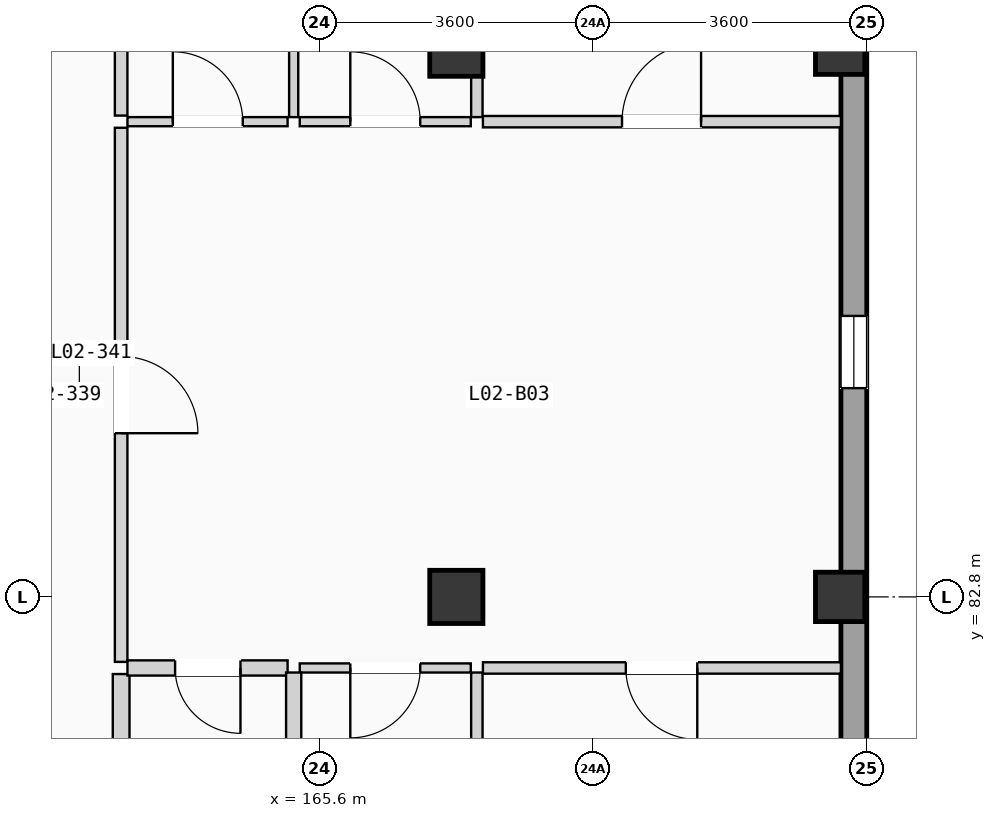
"""IFC4 building model, lengths in metres.
Left out: names, types, materials, properties, quantities, classifications, styles, units other than length and angle.
Written with IfcOpenShell. Run it as: python <this file> out.ifc"""

import sys

from ifc_helpers import new_model, si_unit, direction, frame, frame_2d, origin, origin_2d, place, context, subcontext, project, spatial, rectangle, extrude, element, fill, save


model = new_model("IFC4")
c1 = context("Model", 3, precision=1e-05, world=origin(), true_north=direction((0.0, 1.0)))
c2 = subcontext(c1, "Body", "Model", "MODEL_VIEW")
j1 = project(units=[si_unit("LENGTHUNIT", "METRE"), si_unit("PLANEANGLEUNIT", "RADIAN")], contexts=[c1])
p1 = place(None, origin())
s1 = spatial("IfcSite", under=j1, at=p1, CompositionType="ELEMENT")
p2 = place(p1, origin())
s2 = spatial("IfcBuilding", under=s1, at=p2, CompositionType="ELEMENT")
p3 = place(p2, frame((0.0, 0.0, 8.575)))
s3 = spatial("IfcBuildingStorey", under=s2, at=p3, CompositionType="ELEMENT", Elevation=8.575)
for number, where, z_axis, x_axis in (
    (1, (167.4, 82.8, 0.0), (0.0, 0.0, 1.0), (1.0, 0.0, 0.0)),
    (2, (167.4, 90.0, 0.0), (0.0, 0.0, 1.0), (1.0, 0.0, 0.0)),
):
    element("IfcColumn", number, at=place(p3, frame(where, z_axis=z_axis, x_axis=x_axis)), inside=s3, PredefinedType="COLUMN", context=c2, shape_type="SweptSolid", body=[
        extrude(rectangle(XDim=0.7, YDim=0.7, at=origin_2d()), origin(), (0.0, 0.0, 1.0), 3.5),
    ])
for number, where, z_axis, x_axis in (
    (3, (172.45, 82.8, 0.0), (0.0, 0.0, 1.0), (1.0, 0.0, 0.0)),
    (4, (172.45, 90.0, 0.0), (0.0, 0.0, 1.0), (1.0, 0.0, 0.0)),
):
    element("IfcColumn", number, at=place(p3, frame(where, z_axis=z_axis, x_axis=x_axis)), inside=s3, PredefinedType="COLUMN", context=c2, shape_type="SweptSolid", body=[
        extrude(rectangle(XDim=0.65, YDim=0.65, at=origin_2d()), origin(), (0.0, 0.0, 1.0), 3.5),
    ])
p4 = place(p3, frame((172.63, 68.74, 0.0), z_axis=(0.0, 0.0, 1.0), x_axis=(0.0, 1.0, 0.0)))
e5 = element("IfcWall", 5, at=p4, inside=s3, PredefinedType="SOLIDWALL", context=c2, shape_type="SweptSolid", body=[
    extrude(rectangle(XDim=49.72, YDim=0.34, at=frame_2d((24.86, 0.0))), origin(), (0.0, 0.0, 1.0), 3.24),
])
p5 = place(p4, frame((16.807, 0.0, 0.9)))
e6 = element("IfcOpeningElement", 6, at=p5, cuts=e5, PredefinedType="OPENING", context=c2, shape_type="SweptSolid", body=[
    extrude(rectangle(XDim=0.95, YDim=1.5, at=frame_2d((0.475, 0.75))), frame((0.0, 0.18, 0.0), z_axis=(0.0, -1.0, 0.0), x_axis=(1.0, 0.0, 0.0)), (0.0, 0.0, 1.0), 0.36),
])
p6 = place(p4, frame((9.678, 0.0, 0.9)))
e7 = element("IfcOpeningElement", 7, at=p6, cuts=e5, PredefinedType="OPENING", context=c2, shape_type="SweptSolid", body=[
    extrude(rectangle(XDim=0.95, YDim=1.65, at=frame_2d((0.475, 0.825))), frame((0.0, 0.18, 0.0), z_axis=(0.0, -1.0, 0.0), x_axis=(1.0, 0.0, 0.0)), (0.0, 0.0, 1.0), 0.36),
])
p7 = place(p4, frame((23.379, 0.0, 0.755)))
e8 = element("IfcOpeningElement", 8, at=p7, cuts=e5, PredefinedType="OPENING", context=c2, shape_type="SweptSolid", body=[
    extrude(rectangle(XDim=0.95, YDim=1.8, at=frame_2d((0.475, 0.9))), frame((0.0, 0.18, 0.0), z_axis=(0.0, -1.0, 0.0), x_axis=(1.0, 0.0, 0.0)), (0.0, 0.0, 1.0), 0.36),
])
p8 = place(p4, frame((32.885, 0.0, 0.9)))
e9 = element("IfcOpeningElement", 9, at=p8, cuts=e5, PredefinedType="OPENING", context=c2, shape_type="SweptSolid", body=[
    extrude(rectangle(XDim=1.05, YDim=1.2, at=frame_2d((0.525, 0.6))), frame((0.0, 0.18, 0.0), z_axis=(0.0, -1.0, 0.0), x_axis=(1.0, 0.0, 0.0)), (0.0, 0.0, 1.0), 0.36),
])
p9 = place(p4, frame((29.475, 0.0, 0.9)))
e10 = element("IfcOpeningElement", 10, at=p9, cuts=e5, PredefinedType="OPENING", context=c2, shape_type="SweptSolid", body=[
    extrude(rectangle(XDim=1.05, YDim=1.35, at=frame_2d((0.525, 0.675))), frame((0.0, 0.18, 0.0), z_axis=(0.0, -1.0, 0.0), x_axis=(1.0, 0.0, 0.0)), (0.0, 0.0, 1.0), 0.36),
])
p10 = place(p4, frame((39.479, 0.0, 0.9)))
e11 = element("IfcOpeningElement", 11, at=p10, cuts=e5, PredefinedType="OPENING", context=c2, shape_type="SweptSolid", body=[
    extrude(rectangle(XDim=1.05, YDim=1.5, at=frame_2d((0.525, 0.75))), frame((0.0, 0.18, 0.0), z_axis=(0.0, -1.0, 0.0), x_axis=(1.0, 0.0, 0.0)), (0.0, 0.0, 1.0), 0.36),
])
p11 = place(p3, frame((162.99, 81.945, 0.0), z_axis=(0.0, 0.0, 1.0), x_axis=(0.0, 1.0, 0.0)))
e12 = element("IfcWall", 12, at=p11, inside=s3, PredefinedType="PARTITIONING", context=c2, shape_type="SweptSolid", body=[
    extrude(rectangle(XDim=7.028, YDim=0.165, at=frame_2d((3.514, 0.0))), origin(), (0.0, 0.0, 1.0), 3.22),
])
p12 = place(p11, frame((3.009, 0.0, 0.0)))
e13 = element("IfcOpeningElement", 13, at=p12, cuts=e12, PredefinedType="OPENING", context=c2, shape_type="SweptSolid", body=[
    extrude(rectangle(XDim=1.01, YDim=2.11, at=frame_2d((0.505, 1.055))), frame((0.0, 0.093, 0.0), z_axis=(0.0, -1.0, 0.0), x_axis=(1.0, 0.0, 0.0)), (0.0, 0.0, 1.0), 0.185),
])
p13 = place(p3, frame((162.99, 75.975, 0.0), z_axis=(0.0, 0.0, 1.0), x_axis=(0.0, 1.0, 0.0)))
e14 = element("IfcWall", 14, at=p13, inside=s3, PredefinedType="PLUMBINGWALL", context=c2, shape_type="SweptSolid", body=[
    extrude(rectangle(XDim=5.81, YDim=0.22, at=frame_2d((2.905, 0.0))), origin(), (0.0, 0.0, 1.0), 3.22),
])
p14 = place(p3, frame((162.99, 89.133, 0.0), z_axis=(0.0, 0.0, 1.0), x_axis=(0.0, 1.0, 0.0)))
e15 = element("IfcWall", 15, at=p14, inside=s3, PredefinedType="PARTITIONING", context=c2, shape_type="SweptSolid", body=[
    extrude(rectangle(XDim=5.785, YDim=0.165, at=frame_2d((2.893, 0.0))), origin(), (0.0, 0.0, 1.0), 3.22),
])
p15 = place(p3, frame((163.073, 81.865, 0.0), z_axis=(0.0, 0.0, 1.0), x_axis=(1.0, 0.0, 0.0)))
e16 = element("IfcWall", 16, at=p15, inside=s3, PredefinedType="PLUMBINGWALL", context=c2, shape_type="SweptSolid", body=[
    extrude(rectangle(XDim=2.107, YDim=0.2, at=frame_2d((1.053, 0.0))), origin(), (0.0, 0.0, 1.0), 3.22),
])
p16 = place(p15, frame((0.627, 0.0, 0.0)))
e17 = element("IfcOpeningElement", 17, at=p16, cuts=e16, PredefinedType="OPENING", context=c2, shape_type="SweptSolid", body=[
    extrude(rectangle(XDim=0.86, YDim=2.0, at=frame_2d((0.43, 1.0))), frame((0.0, 0.11, 0.0), z_axis=(0.0, -1.0, 0.0), x_axis=(1.0, 0.0, 0.0)), (0.0, 0.0, 1.0), 0.22),
])
p17 = place(p3, frame((163.073, 89.053, 0.0), z_axis=(0.0, 0.0, 1.0), x_axis=(1.0, 0.0, 0.0)))
e18 = element("IfcWall", 18, at=p17, inside=s3, PredefinedType="PARTITIONING", context=c2, shape_type="SweptSolid", body=[
    extrude(rectangle(XDim=2.107, YDim=0.12, at=frame_2d((1.053, 0.0))), origin(), (0.0, 0.0, 1.0), 3.22),
])
p18 = place(p17, frame((0.597, 0.0, 0.0)))
e19 = element("IfcOpeningElement", 19, at=p18, cuts=e18, PredefinedType="OPENING", context=c2, shape_type="SweptSolid", body=[
    extrude(rectangle(XDim=0.92, YDim=2.02, at=frame_2d((0.46, 1.01))), frame((0.0, 0.07, 0.0), z_axis=(0.0, -1.0, 0.0), x_axis=(1.0, 0.0, 0.0)), (0.0, 0.0, 1.0), 0.14),
])
p19 = place(p3, frame((167.75, 81.865, 0.0), z_axis=(0.0, 0.0, 1.0), x_axis=(1.0, 0.0, 0.0)))
e20 = element("IfcWall", 20, at=p19, inside=s3, PredefinedType="PARTITIONING", context=c2, shape_type="SweptSolid", body=[
    extrude(rectangle(XDim=4.71, YDim=0.15, at=frame_2d((2.355, 0.0))), origin(), (0.0, 0.0, 1.0), 3.22),
])
p20 = place(p19, frame((1.88, 0.0, 0.0)))
e21 = element("IfcOpeningElement", 21, at=p20, cuts=e20, PredefinedType="OPENING", context=c2, shape_type="SweptSolid", body=[
    extrude(rectangle(XDim=0.94, YDim=2.06, at=frame_2d((0.47, 1.03))), frame((0.0, 0.085, 0.0), z_axis=(0.0, -1.0, 0.0), x_axis=(1.0, 0.0, 0.0)), (0.0, 0.0, 1.0), 0.17),
])
p21 = place(p3, frame((165.34, 81.865, 0.0), z_axis=(0.0, 0.0, 1.0), x_axis=(1.0, 0.0, 0.0)))
e22 = element("IfcWall", 22, at=p21, inside=s3, PredefinedType="PARTITIONING", context=c2, shape_type="SweptSolid", body=[
    extrude(rectangle(XDim=2.25, YDim=0.12, at=frame_2d((1.125, 0.0))), origin(), (0.0, 0.0, 1.0), 3.22),
])
p22 = place(p21, frame((0.665, 0.0, 0.0)))
e23 = element("IfcOpeningElement", 23, at=p22, cuts=e22, PredefinedType="OPENING", context=c2, shape_type="SweptSolid", body=[
    extrude(rectangle(XDim=0.92, YDim=2.02, at=frame_2d((0.46, 1.01))), frame((0.0, 0.07, 0.0), z_axis=(0.0, -1.0, 0.0), x_axis=(1.0, 0.0, 0.0)), (0.0, 0.0, 1.0), 0.14),
])
p23 = place(p3, frame((167.75, 89.053, 0.0), z_axis=(0.0, 0.0, 1.0), x_axis=(1.0, 0.0, 0.0)))
e24 = element("IfcWall", 24, at=p23, inside=s3, PredefinedType="PARTITIONING", context=c2, shape_type="SweptSolid", body=[
    extrude(rectangle(XDim=4.71, YDim=0.15, at=frame_2d((2.355, 0.0))), origin(), (0.0, 0.0, 1.0), 3.22),
])
p24 = place(p23, frame((1.83, 0.0, 0.0)))
e25 = element("IfcOpeningElement", 25, at=p24, cuts=e24, PredefinedType="OPENING", context=c2, shape_type="SweptSolid", body=[
    extrude(rectangle(XDim=1.04, YDim=2.08, at=frame_2d((0.52, 1.04))), frame((0.0, 0.085, 0.0), z_axis=(0.0, -1.0, 0.0), x_axis=(1.0, 0.0, 0.0)), (0.0, 0.0, 1.0), 0.17),
])
p25 = place(p3, frame((165.34, 89.053, 0.0), z_axis=(0.0, 0.0, 1.0), x_axis=(1.0, 0.0, 0.0)))
e26 = element("IfcWall", 26, at=p25, inside=s3, PredefinedType="PARTITIONING", context=c2, shape_type="SweptSolid", body=[
    extrude(rectangle(XDim=2.25, YDim=0.12, at=frame_2d((1.125, 0.0))), origin(), (0.0, 0.0, 1.0), 3.22),
])
p26 = place(p25, frame((0.665, 0.0, 0.0)))
e27 = element("IfcOpeningElement", 27, at=p26, cuts=e26, PredefinedType="OPENING", context=c2, shape_type="SweptSolid", body=[
    extrude(rectangle(XDim=0.92, YDim=2.02, at=frame_2d((0.46, 1.01))), frame((0.0, 0.07, 0.0), z_axis=(0.0, -1.0, 0.0), x_axis=(1.0, 0.0, 0.0)), (0.0, 0.0, 1.0), 0.14),
])
p27 = place(p3, frame((165.26, 75.975, 0.0), z_axis=(0.0, 0.0, 1.0), x_axis=(0.0, 1.0, 0.0)))
e28 = element("IfcWall", 28, at=p27, inside=s3, PredefinedType="PLUMBINGWALL", context=c2, shape_type="SweptSolid", body=[
    extrude(rectangle(XDim=5.83, YDim=0.2, at=frame_2d((2.915, 0.0))), origin(), (0.0, 0.0, 1.0), 3.22),
])
p28 = place(p27, frame((2.493, 0.0, 0.0)))
e29 = element("IfcOpeningElement", 29, at=p28, cuts=e28, PredefinedType="OPENING", context=c2, shape_type="SweptSolid", body=[
    extrude(rectangle(XDim=0.85, YDim=2.01, at=frame_2d((0.425, 1.005))), frame((0.0, 0.11, 0.0), z_axis=(0.0, -1.0, 0.0), x_axis=(1.0, 0.0, 0.0)), (0.0, 0.0, 1.0), 0.22),
])
p29 = place(p3, frame((165.26, 89.113, 0.0), z_axis=(0.0, 0.0, 1.0), x_axis=(0.0, 1.0, 0.0)))
e30 = element("IfcWall", 30, at=p29, inside=s3, PredefinedType="PARTITIONING", context=c2, shape_type="SweptSolid", body=[
    extrude(rectangle(XDim=5.805, YDim=0.12, at=frame_2d((2.902, 0.0))), origin(), (0.0, 0.0, 1.0), 3.22),
])
for number, where, z_axis, x_axis in (
    (31, (167.67, 76.0, 0.0), (0.0, 0.0, 1.0), (0.0, 1.0, 0.0)),
    (32, (167.67, 89.113, 0.0), (0.0, 0.0, 1.0), (0.0, 1.0, 0.0)),
):
    element("IfcWall", number, at=place(p3, frame(where, z_axis=z_axis, x_axis=x_axis)), inside=s3, PredefinedType="PARTITIONING", context=c2, shape_type="SweptSolid", body=[
        extrude(rectangle(XDim=5.805, YDim=0.15, at=frame_2d((2.902, 0.0))), origin(), (0.0, 0.0, 1.0), 3.22),
    ])
p30 = place(p5, origin())
e33 = element("IfcWindow", 33, at=p30, inside=s3, PartitioningType="SINGLE_PANEL", PredefinedType="WINDOW", context=c2, shape_type="SweptSolid", body=[
    extrude(rectangle(XDim=0.95, YDim=1.5, at=frame_2d((0.475, 0.75))), frame((0.0, 0.03, 0.0), z_axis=(0.0, -1.0, 0.0), x_axis=(1.0, 0.0, 0.0)), (0.0, 0.0, 1.0), 0.06),
])
fill(e6, e33)
p31 = place(p12, frame((1.01, 0.0, 0.0), z_axis=(0.0, 0.0, 1.0), x_axis=(-1.0, 0.0, 0.0)))
e34 = element("IfcDoor", 34, at=p31, inside=s3, OperationType="SINGLE_SWING_LEFT", PredefinedType="DOOR", context=c2, shape_type="SweptSolid", body=[
    extrude(rectangle(XDim=1.01, YDim=2.11, at=frame_2d((0.505, 1.055))), frame((0.0, 0.025, 0.0), z_axis=(0.0, -1.0, 0.0), x_axis=(1.0, 0.0, 0.0)), (0.0, 0.0, 1.0), 0.05),
])
fill(e13, e34)
p32 = place(p16, frame((0.86, 0.0, 0.0), z_axis=(0.0, 0.0, 1.0), x_axis=(-1.0, 0.0, 0.0)))
e35 = element("IfcDoor", 35, at=p32, inside=s3, OperationType="SINGLE_SWING_RIGHT", PredefinedType="DOOR", context=c2, shape_type="SweptSolid", body=[
    extrude(rectangle(XDim=0.86, YDim=2.0, at=frame_2d((0.43, 1.0))), frame((0.0, 0.025, 0.0), z_axis=(0.0, -1.0, 0.0), x_axis=(1.0, 0.0, 0.0)), (0.0, 0.0, 1.0), 0.05),
])
fill(e17, e35)
p33 = place(p18, origin())
e36 = element("IfcDoor", 36, at=p33, inside=s3, OperationType="SINGLE_SWING_LEFT", PredefinedType="DOOR", context=c2, shape_type="SweptSolid", body=[
    extrude(rectangle(XDim=0.92, YDim=2.02, at=frame_2d((0.46, 1.01))), frame((0.0, 0.025, 0.0), z_axis=(0.0, -1.0, 0.0), x_axis=(1.0, 0.0, 0.0)), (0.0, 0.0, 1.0), 0.05),
])
fill(e19, e36)
p34 = place(p20, frame((0.94, 0.0, 0.0), z_axis=(0.0, 0.0, 1.0), x_axis=(-1.0, 0.0, 0.0)))
e37 = element("IfcDoor", 37, at=p34, inside=s3, OperationType="SINGLE_SWING_RIGHT", PredefinedType="DOOR", context=c2, shape_type="SweptSolid", body=[
    extrude(rectangle(XDim=0.94, YDim=2.06, at=frame_2d((0.47, 1.03))), frame((0.0, 0.025, 0.0), z_axis=(0.0, -1.0, 0.0), x_axis=(1.0, 0.0, 0.0)), (0.0, 0.0, 1.0), 0.05),
])
fill(e21, e37)
p35 = place(p22, frame((0.92, 0.0, 0.0), z_axis=(0.0, 0.0, 1.0), x_axis=(-1.0, 0.0, 0.0)))
e38 = element("IfcDoor", 38, at=p35, inside=s3, OperationType="SINGLE_SWING_LEFT", PredefinedType="DOOR", context=c2, shape_type="SweptSolid", body=[
    extrude(rectangle(XDim=0.92, YDim=2.02, at=frame_2d((0.46, 1.01))), frame((0.0, 0.025, 0.0), z_axis=(0.0, -1.0, 0.0), x_axis=(1.0, 0.0, 0.0)), (0.0, 0.0, 1.0), 0.05),
])
fill(e23, e38)
p36 = place(p24, origin())
e39 = element("IfcDoor", 39, at=p36, inside=s3, OperationType="SINGLE_SWING_RIGHT", PredefinedType="DOOR", context=c2, shape_type="SweptSolid", body=[
    extrude(rectangle(XDim=1.04, YDim=2.08, at=frame_2d((0.52, 1.04))), frame((0.0, 0.025, 0.0), z_axis=(0.0, -1.0, 0.0), x_axis=(1.0, 0.0, 0.0)), (0.0, 0.0, 1.0), 0.05),
])
fill(e25, e39)
p37 = place(p26, origin())
e40 = element("IfcDoor", 40, at=p37, inside=s3, OperationType="SINGLE_SWING_LEFT", PredefinedType="DOOR", context=c2, shape_type="SweptSolid", body=[
    extrude(rectangle(XDim=0.92, YDim=2.02, at=frame_2d((0.46, 1.01))), frame((0.0, 0.025, 0.0), z_axis=(0.0, -1.0, 0.0), x_axis=(1.0, 0.0, 0.0)), (0.0, 0.0, 1.0), 0.05),
])
fill(e27, e40)
save(model, sys.argv[1])
